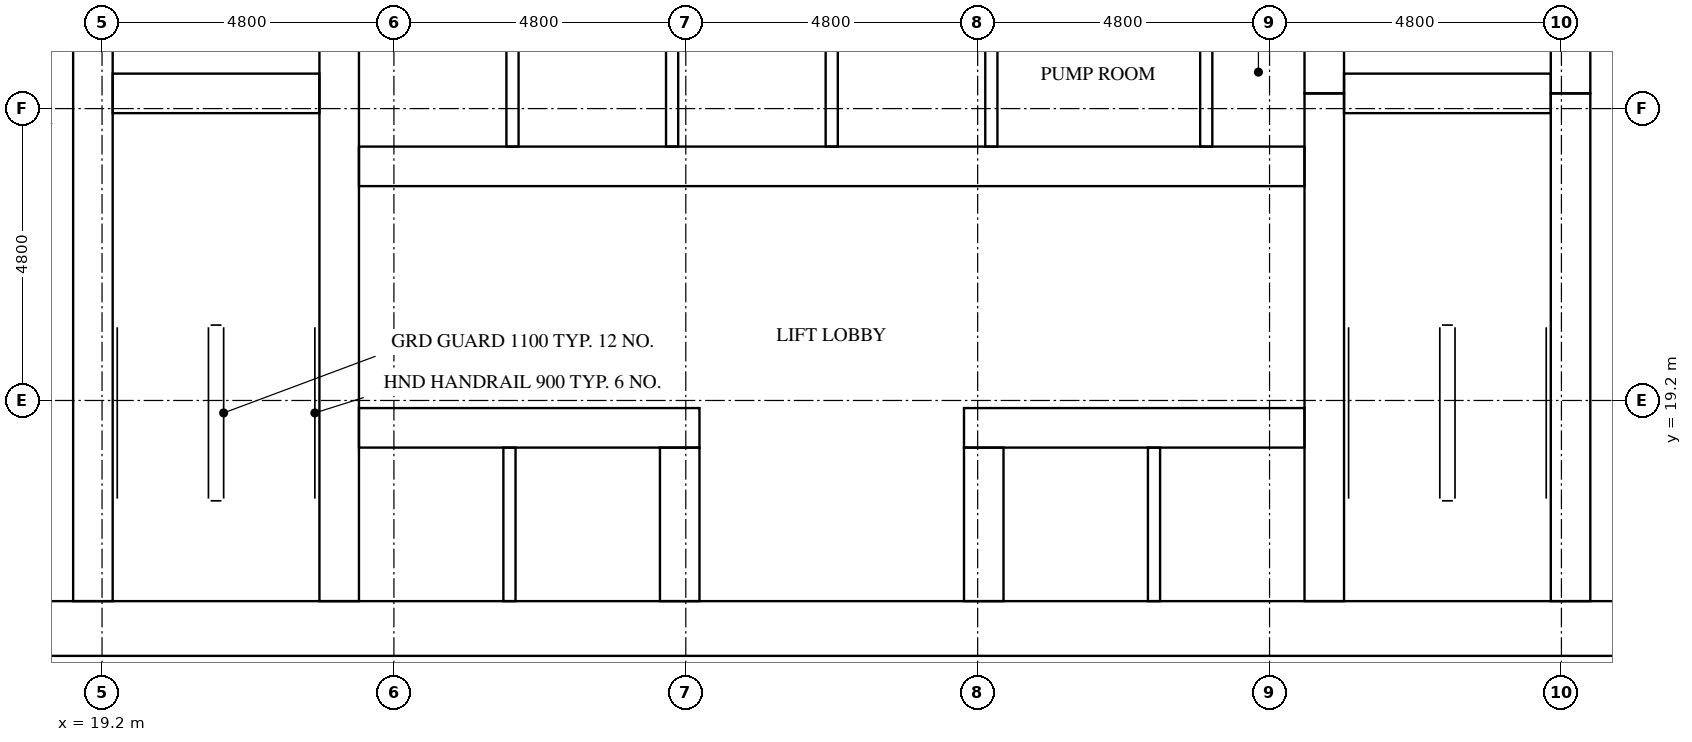
"""IFC4 building model, lengths in metres.
Left out: names, types, materials, properties, quantities, classifications, styles, units other than length and angle.
Written with IfcOpenShell. Run it as: python <this file> out.ifc"""

import sys

from ifc_helpers import new_model, si_unit, direction, frame, frame_2d, origin, place, context, subcontext, project, spatial, rectangle, extrude, element, fill, save


model = new_model("IFC4")
c1 = context("Model", 3, precision=1e-05, world=origin(), true_north=direction((0.0, 1.0)))
c2 = subcontext(c1, "Body", "Model", "MODEL_VIEW")
j1 = project(units=[si_unit("LENGTHUNIT", "METRE"), si_unit("PLANEANGLEUNIT", "RADIAN")], contexts=[c1])
p1 = place(None, origin())
s1 = spatial("IfcSite", under=j1, at=p1, CompositionType="ELEMENT")
p2 = place(p1, origin())
s2 = spatial("IfcBuilding", under=s1, at=p2, CompositionType="ELEMENT")
p3 = place(p2, frame((0.0, 0.0, 59.3)))
s3 = spatial("IfcBuildingStorey", under=s2, at=p3, CompositionType="ELEMENT", Elevation=59.3)
p4 = place(p3, frame((15.0, 15.45, 0.0), z_axis=(0.0, 0.0, 1.0), x_axis=(1.0, 0.0, 0.0)))
e1 = element("IfcWall", 1, at=p4, inside=s3, PredefinedType="SHEAR", context=c2, shape_type="SweptSolid", body=[
    extrude(rectangle(XDim=32.4, YDim=0.9, at=frame_2d((16.2, 0.0))), origin(), (0.0, 0.0, 1.0), 3.2),
])
p5 = place(p4, frame((15.3, 0.0, 0.0)))
e2 = element("IfcOpeningElement", 2, at=p5, cuts=e1, PredefinedType="OPENING", context=c2, shape_type="SweptSolid", body=[
    extrude(rectangle(XDim=1.8, YDim=2.1, at=frame_2d((0.9, 1.05))), frame((0.0, 0.46, 0.0), z_axis=(0.0, -1.0, 0.0), x_axis=(1.0, 0.0, 0.0)), (0.0, 0.0, 1.0), 0.92),
])
p6 = place(p3, frame((19.05, 15.9, 0.0), z_axis=(0.0, 0.0, 1.0), x_axis=(0.0, 1.0, 0.0)))
e3 = element("IfcWall", 3, at=p6, inside=s3, PredefinedType="SHEAR", context=c2, shape_type="SweptSolid", body=[
    extrude(rectangle(XDim=15.025, YDim=0.65, at=frame_2d((7.513, 0.0))), origin(), (0.0, 0.0, 1.0), 3.2),
])
p7 = place(p6, frame((9.55, 0.0, 0.0)))
e4 = element("IfcOpeningElement", 4, at=p7, cuts=e3, PredefinedType="OPENING", context=c2, shape_type="SweptSolid", body=[
    extrude(rectangle(XDim=1.1, YDim=2.1, at=frame_2d((0.55, 1.05))), frame((0.0, 0.335, 0.0), z_axis=(0.0, -1.0, 0.0), x_axis=(1.0, 0.0, 0.0)), (0.0, 0.0, 1.0), 0.67),
])
p8 = place(p6, frame((13.05, 0.0, 0.0)))
e5 = element("IfcOpeningElement", 5, at=p8, cuts=e3, PredefinedType="OPENING", context=c2, shape_type="SweptSolid", body=[
    extrude(rectangle(XDim=1.1, YDim=2.1, at=frame_2d((0.55, 1.05))), frame((0.0, 0.335, 0.0), z_axis=(0.0, -1.0, 0.0), x_axis=(1.0, 0.0, 0.0)), (0.0, 0.0, 1.0), 0.67),
])
p9 = place(p6, frame((0.3, 0.0, 0.0)))
e6 = element("IfcOpeningElement", 6, at=p9, cuts=e3, PredefinedType="OPENING", context=c2, shape_type="SweptSolid", body=[
    extrude(rectangle(XDim=1.2, YDim=2.1, at=frame_2d((0.6, 1.05))), frame((0.0, 0.335, 0.0), z_axis=(0.0, -1.0, 0.0), x_axis=(1.0, 0.0, 0.0)), (0.0, 0.0, 1.0), 0.67),
])
p10 = place(p3, frame((23.1, 15.9, 0.0), z_axis=(0.0, 0.0, 1.0), x_axis=(0.0, 1.0, 0.0)))
e7 = element("IfcWall", 7, at=p10, inside=s3, PredefinedType="SHEAR", context=c2, shape_type="SweptSolid", body=[
    extrude(rectangle(XDim=21.0, YDim=0.65, at=frame_2d((10.5, 0.0))), origin(), (0.0, 0.0, 1.0), 3.2),
])
p11 = place(p3, frame((39.3, 15.9, 0.0), z_axis=(0.0, 0.0, 1.0), x_axis=(0.0, 1.0, 0.0)))
e8 = element("IfcWall", 8, at=p11, inside=s3, PredefinedType="SHEAR", context=c2, shape_type="SweptSolid", body=[
    extrude(rectangle(XDim=8.35, YDim=0.65, at=frame_2d((4.175, 0.0))), origin(), (0.0, 0.0, 1.0), 3.2),
])
p12 = place(p3, frame((39.3, 24.25, 0.0), z_axis=(0.0, 0.0, 1.0), x_axis=(0.0, 1.0, 0.0)))
e9 = element("IfcWall", 9, at=p12, inside=s3, PredefinedType="SHEAR", context=c2, shape_type="SweptSolid", body=[
    extrude(rectangle(XDim=3.5, YDim=0.65, at=frame_2d((1.75, 0.0))), origin(), (0.0, 0.0, 1.0), 3.2),
])
p13 = place(p3, frame((43.35, 15.9, 0.0), z_axis=(0.0, 0.0, 1.0), x_axis=(0.0, 1.0, 0.0)))
e10 = element("IfcWall", 10, at=p13, inside=s3, PredefinedType="SHEAR", context=c2, shape_type="SweptSolid", body=[
    extrude(rectangle(XDim=8.35, YDim=0.65, at=frame_2d((4.175, 0.0))), origin(), (0.0, 0.0, 1.0), 3.2),
])
p14 = place(p13, frame((0.3, 0.0, 0.0)))
e11 = element("IfcOpeningElement", 11, at=p14, cuts=e10, PredefinedType="OPENING", context=c2, shape_type="SweptSolid", body=[
    extrude(rectangle(XDim=1.2, YDim=2.1, at=frame_2d((0.6, 1.05))), frame((0.0, 0.335, 0.0), z_axis=(0.0, -1.0, 0.0), x_axis=(1.0, 0.0, 0.0)), (0.0, 0.0, 1.0), 0.67),
])
p15 = place(p3, frame((43.35, 24.25, 0.0), z_axis=(0.0, 0.0, 1.0), x_axis=(0.0, 1.0, 0.0)))
e12 = element("IfcWall", 12, at=p15, inside=s3, PredefinedType="SHEAR", context=c2, shape_type="SweptSolid", body=[
    extrude(rectangle(XDim=3.5, YDim=0.65, at=frame_2d((1.75, 0.0))), origin(), (0.0, 0.0, 1.0), 3.2),
])
p16 = place(p15, frame((1.2, 0.0, 0.0)))
e13 = element("IfcOpeningElement", 13, at=p16, cuts=e12, PredefinedType="OPENING", context=c2, shape_type="SweptSolid", body=[
    extrude(rectangle(XDim=1.1, YDim=2.1, at=frame_2d((0.55, 1.05))), frame((0.0, 0.335, 0.0), z_axis=(0.0, -1.0, 0.0), x_axis=(1.0, 0.0, 0.0)), (0.0, 0.0, 1.0), 0.67),
])
for number, where, z_axis, x_axis in (
    (14, (19.375, 24.25, 0.0), (0.0, 0.0, 1.0), (1.0, 0.0, 0.0)),
    (15, (39.625, 24.25, 0.0), (0.0, 0.0, 1.0), (1.0, 0.0, 0.0)),
):
    element("IfcWall", number, at=place(p3, frame(where, z_axis=z_axis, x_axis=x_axis)), inside=s3, PredefinedType="SHEAR", context=c2, shape_type="SweptSolid", body=[
        extrude(rectangle(XDim=3.4, YDim=0.65, at=frame_2d((1.7, 0.0))), origin(), (0.0, 0.0, 1.0), 3.2),
    ])
p17 = place(p3, frame((23.425, 18.75, 0.0), z_axis=(0.0, 0.0, 1.0), x_axis=(1.0, 0.0, 0.0)))
e16 = element("IfcWall", 16, at=p17, inside=s3, PredefinedType="SHEAR", context=c2, shape_type="SweptSolid", body=[
    extrude(rectangle(XDim=5.6, YDim=0.65, at=frame_2d((2.8, 0.0))), origin(), (0.0, 0.0, 1.0), 3.2),
])
p18 = place(p17, frame((0.637, 0.0, 0.0)))
e17 = element("IfcOpeningElement", 17, at=p18, cuts=e16, PredefinedType="OPENING", context=c2, shape_type="SweptSolid", body=[
    extrude(rectangle(XDim=1.1, YDim=2.1, at=frame_2d((0.55, 1.05))), frame((0.0, 0.335, 0.0), z_axis=(0.0, -1.0, 0.0), x_axis=(1.0, 0.0, 0.0)), (0.0, 0.0, 1.0), 0.67),
])
p19 = place(p17, frame((3.212, 0.0, 0.0)))
e18 = element("IfcOpeningElement", 18, at=p19, cuts=e16, PredefinedType="OPENING", context=c2, shape_type="SweptSolid", body=[
    extrude(rectangle(XDim=1.1, YDim=2.1, at=frame_2d((0.55, 1.05))), frame((0.0, 0.335, 0.0), z_axis=(0.0, -1.0, 0.0), x_axis=(1.0, 0.0, 0.0)), (0.0, 0.0, 1.0), 0.67),
])
p20 = place(p3, frame((33.375, 18.75, 0.0), z_axis=(0.0, 0.0, 1.0), x_axis=(1.0, 0.0, 0.0)))
e19 = element("IfcWall", 19, at=p20, inside=s3, PredefinedType="SHEAR", context=c2, shape_type="SweptSolid", body=[
    extrude(rectangle(XDim=5.6, YDim=0.65, at=frame_2d((2.8, 0.0))), origin(), (0.0, 0.0, 1.0), 3.2),
])
p21 = place(p20, frame((1.288, 0.0, 0.0)))
e20 = element("IfcOpeningElement", 20, at=p21, cuts=e19, PredefinedType="OPENING", context=c2, shape_type="SweptSolid", body=[
    extrude(rectangle(XDim=1.1, YDim=2.1, at=frame_2d((0.55, 1.05))), frame((0.0, 0.335, 0.0), z_axis=(0.0, -1.0, 0.0), x_axis=(1.0, 0.0, 0.0)), (0.0, 0.0, 1.0), 0.67),
])
p22 = place(p20, frame((3.863, 0.0, 0.0)))
e21 = element("IfcOpeningElement", 21, at=p22, cuts=e19, PredefinedType="OPENING", context=c2, shape_type="SweptSolid", body=[
    extrude(rectangle(XDim=1.1, YDim=2.1, at=frame_2d((0.55, 1.05))), frame((0.0, 0.335, 0.0), z_axis=(0.0, -1.0, 0.0), x_axis=(1.0, 0.0, 0.0)), (0.0, 0.0, 1.0), 0.67),
])
p23 = place(p3, frame((23.425, 23.05, 0.0), z_axis=(0.0, 0.0, 1.0), x_axis=(1.0, 0.0, 0.0)))
e22 = element("IfcWall", 22, at=p23, inside=s3, PredefinedType="SHEAR", context=c2, shape_type="SweptSolid", body=[
    extrude(rectangle(XDim=15.55, YDim=0.65, at=frame_2d((7.775, 0.0))), origin(), (0.0, 0.0, 1.0), 3.2),
])
p24 = place(p23, frame((0.663, 0.0, 0.0)))
e23 = element("IfcOpeningElement", 23, at=p24, cuts=e22, PredefinedType="OPENING", context=c2, shape_type="SweptSolid", body=[
    extrude(rectangle(XDim=1.1, YDim=2.1, at=frame_2d((0.55, 1.05))), frame((0.0, 0.335, 0.0), z_axis=(0.0, -1.0, 0.0), x_axis=(1.0, 0.0, 0.0)), (0.0, 0.0, 1.0), 0.67),
])
p25 = place(p23, frame((3.288, 0.0, 0.0)))
e24 = element("IfcOpeningElement", 24, at=p25, cuts=e22, PredefinedType="OPENING", context=c2, shape_type="SweptSolid", body=[
    extrude(rectangle(XDim=1.1, YDim=2.1, at=frame_2d((0.55, 1.05))), frame((0.0, 0.335, 0.0), z_axis=(0.0, -1.0, 0.0), x_axis=(1.0, 0.0, 0.0)), (0.0, 0.0, 1.0), 0.67),
])
p26 = place(p23, frame((11.667, 0.0, 0.0)))
e25 = element("IfcOpeningElement", 25, at=p26, cuts=e22, PredefinedType="OPENING", context=c2, shape_type="SweptSolid", body=[
    extrude(rectangle(XDim=1.0, YDim=2.1, at=frame_2d((0.5, 1.05))), frame((0.0, 0.335, 0.0), z_axis=(0.0, -1.0, 0.0), x_axis=(1.0, 0.0, 0.0)), (0.0, 0.0, 1.0), 0.67),
])
p27 = place(p23, frame((14.292, 0.0, 0.0)))
e26 = element("IfcOpeningElement", 26, at=p27, cuts=e22, PredefinedType="OPENING", context=c2, shape_type="SweptSolid", body=[
    extrude(rectangle(XDim=1.0, YDim=2.1, at=frame_2d((0.5, 1.05))), frame((0.0, 0.335, 0.0), z_axis=(0.0, -1.0, 0.0), x_axis=(1.0, 0.0, 0.0)), (0.0, 0.0, 1.0), 0.67),
])
for number, where, z_axis, x_axis in (
    (27, (28.7, 15.9, 0.0), (0.0, 0.0, 1.0), (0.0, 1.0, 0.0)),
    (28, (33.7, 15.9, 0.0), (0.0, 0.0, 1.0), (0.0, 1.0, 0.0)),
):
    element("IfcWall", number, at=place(p3, frame(where, z_axis=z_axis, x_axis=x_axis)), inside=s3, PredefinedType="SHEAR", context=c2, shape_type="SweptSolid", body=[
        extrude(rectangle(XDim=2.525, YDim=0.65, at=frame_2d((1.263, 0.0))), origin(), (0.0, 0.0, 1.0), 3.2),
    ])
for number, where, z_axis, x_axis in (
    (29, (25.95, 23.375, 0.0), (0.0, 0.0, 1.0), (0.0, 1.0, 0.0)),
    (30, (28.575, 23.375, 0.0), (0.0, 0.0, 1.0), (0.0, 1.0, 0.0)),
    (31, (31.2, 23.375, 0.0), (0.0, 0.0, 1.0), (0.0, 1.0, 0.0)),
    (32, (33.825, 23.375, 0.0), (0.0, 0.0, 1.0), (0.0, 1.0, 0.0)),
):
    element("IfcWall", number, at=place(p3, frame(where, z_axis=z_axis, x_axis=x_axis)), inside=s3, PredefinedType="SOLIDWALL", context=c2, shape_type="SweptSolid", body=[
        extrude(rectangle(XDim=2.45, YDim=0.2, at=frame_2d((1.225, 0.0))), origin(), (0.0, 0.0, 1.0), 3.2),
    ])
for number, where, z_axis, x_axis in (
    (33, (25.9, 15.9, 0.0), (0.0, 0.0, 1.0), (0.0, 1.0, 0.0)),
    (34, (36.5, 15.9, 0.0), (0.0, 0.0, 1.0), (0.0, 1.0, 0.0)),
):
    element("IfcWall", number, at=place(p3, frame(where, z_axis=z_axis, x_axis=x_axis)), inside=s3, PredefinedType="SOLIDWALL", context=c2, shape_type="SweptSolid", body=[
        extrude(rectangle(XDim=2.525, YDim=0.2, at=frame_2d((1.263, 0.0))), origin(), (0.0, 0.0, 1.0), 3.2),
    ])
p28 = place(p3, frame((37.359, 23.375, 0.0), z_axis=(0.0, 0.0, 1.0), x_axis=(0.0, 1.0, 0.0)))
e35 = element("IfcWall", 35, at=p28, inside=s3, PredefinedType="PARTITIONING", context=c2, shape_type="SweptSolid", body=[
    extrude(rectangle(XDim=2.45, YDim=0.2, at=frame_2d((1.225, 0.0))), origin(), (0.0, 0.0, 1.0), 3.2),
])
p29 = place(p18, origin())
e36 = element("IfcDoor", 36, at=p29, inside=s3, OperationType="DOUBLE_DOOR_SLIDING", PredefinedType="DOOR", context=c2, shape_type="SweptSolid", body=[
    extrude(rectangle(XDim=1.1, YDim=2.1, at=frame_2d((0.55, 1.05))), frame((0.0, 0.025, 0.0), z_axis=(0.0, -1.0, 0.0), x_axis=(1.0, 0.0, 0.0)), (0.0, 0.0, 1.0), 0.05),
])
fill(e17, e36)
p30 = place(p19, origin())
e37 = element("IfcDoor", 37, at=p30, inside=s3, OperationType="DOUBLE_DOOR_SLIDING", PredefinedType="DOOR", context=c2, shape_type="SweptSolid", body=[
    extrude(rectangle(XDim=1.1, YDim=2.1, at=frame_2d((0.55, 1.05))), frame((0.0, 0.025, 0.0), z_axis=(0.0, -1.0, 0.0), x_axis=(1.0, 0.0, 0.0)), (0.0, 0.0, 1.0), 0.05),
])
fill(e18, e37)
p31 = place(p21, origin())
e38 = element("IfcDoor", 38, at=p31, inside=s3, OperationType="DOUBLE_DOOR_SLIDING", PredefinedType="DOOR", context=c2, shape_type="SweptSolid", body=[
    extrude(rectangle(XDim=1.1, YDim=2.1, at=frame_2d((0.55, 1.05))), frame((0.0, 0.025, 0.0), z_axis=(0.0, -1.0, 0.0), x_axis=(1.0, 0.0, 0.0)), (0.0, 0.0, 1.0), 0.05),
])
fill(e20, e38)
p32 = place(p22, origin())
e39 = element("IfcDoor", 39, at=p32, inside=s3, OperationType="DOUBLE_DOOR_SLIDING", PredefinedType="DOOR", context=c2, shape_type="SweptSolid", body=[
    extrude(rectangle(XDim=1.1, YDim=2.1, at=frame_2d((0.55, 1.05))), frame((0.0, 0.025, 0.0), z_axis=(0.0, -1.0, 0.0), x_axis=(1.0, 0.0, 0.0)), (0.0, 0.0, 1.0), 0.05),
])
fill(e21, e39)
p33 = place(p24, origin())
e40 = element("IfcDoor", 40, at=p33, inside=s3, OperationType="DOUBLE_DOOR_SLIDING", PredefinedType="DOOR", context=c2, shape_type="SweptSolid", body=[
    extrude(rectangle(XDim=1.1, YDim=2.1, at=frame_2d((0.55, 1.05))), frame((0.0, 0.025, 0.0), z_axis=(0.0, -1.0, 0.0), x_axis=(1.0, 0.0, 0.0)), (0.0, 0.0, 1.0), 0.05),
])
fill(e23, e40)
p34 = place(p25, origin())
e41 = element("IfcDoor", 41, at=p34, inside=s3, OperationType="DOUBLE_DOOR_SLIDING", PredefinedType="DOOR", context=c2, shape_type="SweptSolid", body=[
    extrude(rectangle(XDim=1.1, YDim=2.1, at=frame_2d((0.55, 1.05))), frame((0.0, 0.025, 0.0), z_axis=(0.0, -1.0, 0.0), x_axis=(1.0, 0.0, 0.0)), (0.0, 0.0, 1.0), 0.05),
])
fill(e24, e41)
p35 = place(p9, frame((1.2, 0.0, 0.0), z_axis=(0.0, 0.0, 1.0), x_axis=(-1.0, 0.0, 0.0)))
e42 = element("IfcDoor", 42, at=p35, inside=s3, OperationType="SINGLE_SWING_RIGHT", PredefinedType="DOOR", context=c2, shape_type="SweptSolid", body=[
    extrude(rectangle(XDim=1.2, YDim=2.1, at=frame_2d((0.6, 1.05))), frame((0.0, 0.025, 0.0), z_axis=(0.0, -1.0, 0.0), x_axis=(1.0, 0.0, 0.0)), (0.0, 0.0, 1.0), 0.05),
])
fill(e6, e42)
p36 = place(p14, origin())
e43 = element("IfcDoor", 43, at=p36, inside=s3, OperationType="SINGLE_SWING_LEFT", PredefinedType="DOOR", context=c2, shape_type="SweptSolid", body=[
    extrude(rectangle(XDim=1.2, YDim=2.1, at=frame_2d((0.6, 1.05))), frame((0.0, 0.025, 0.0), z_axis=(0.0, -1.0, 0.0), x_axis=(1.0, 0.0, 0.0)), (0.0, 0.0, 1.0), 0.05),
])
fill(e11, e43)
p37 = place(p5, frame((1.8, 0.0, 0.0), z_axis=(0.0, 0.0, 1.0), x_axis=(-1.0, 0.0, 0.0)))
e44 = element("IfcDoor", 44, at=p37, inside=s3, OperationType="DOUBLE_DOOR_SINGLE_SWING", PredefinedType="DOOR", context=c2, shape_type="SweptSolid", body=[
    extrude(rectangle(XDim=1.8, YDim=2.1, at=frame_2d((0.9, 1.05))), frame((0.0, 0.025, 0.0), z_axis=(0.0, -1.0, 0.0), x_axis=(1.0, 0.0, 0.0)), (0.0, 0.0, 1.0), 0.05),
])
fill(e2, e44)
p38 = place(p26, frame((1.0, 0.0, 0.0), z_axis=(0.0, 0.0, 1.0), x_axis=(-1.0, 0.0, 0.0)))
e45 = element("IfcDoor", 45, at=p38, inside=s3, OperationType="SINGLE_SWING_LEFT", PredefinedType="DOOR", context=c2, shape_type="SweptSolid", body=[
    extrude(rectangle(XDim=1.0, YDim=2.1, at=frame_2d((0.5, 1.05))), frame((0.0, 0.025, 0.0), z_axis=(0.0, -1.0, 0.0), x_axis=(1.0, 0.0, 0.0)), (0.0, 0.0, 1.0), 0.05),
])
fill(e25, e45)
p39 = place(p27, frame((1.0, 0.0, 0.0), z_axis=(0.0, 0.0, 1.0), x_axis=(-1.0, 0.0, 0.0)))
e46 = element("IfcDoor", 46, at=p39, inside=s3, OperationType="SINGLE_SWING_RIGHT", PredefinedType="DOOR", context=c2, shape_type="SweptSolid", body=[
    extrude(rectangle(XDim=1.0, YDim=2.1, at=frame_2d((0.5, 1.05))), frame((0.0, 0.025, 0.0), z_axis=(0.0, -1.0, 0.0), x_axis=(1.0, 0.0, 0.0)), (0.0, 0.0, 1.0), 0.05),
])
fill(e26, e46)
save(model, sys.argv[1])
